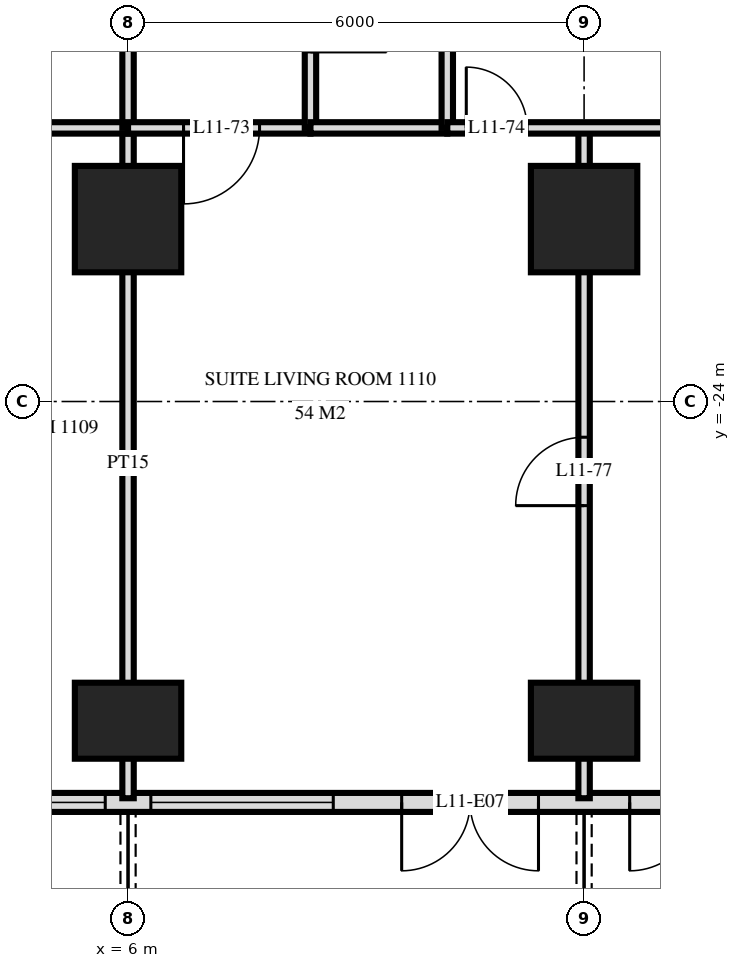
"""IFC4 building model, lengths in metres.
Left out: names, types, materials, properties, quantities, classifications, styles, units other than length and angle.
Written with IfcOpenShell. Run it as: python <this file> out.ifc"""

import sys

from ifc_helpers import new_model, si_unit, direction, frame, frame_2d, origin, origin_2d, place, context, subcontext, project, spatial, rectangle, extrude, element, fill, save


model = new_model("IFC4")
c1 = context("Model", 3, precision=1e-05, world=origin(), true_north=direction((0.0, 1.0)))
c2 = subcontext(c1, "Body", "Model", "MODEL_VIEW")
j1 = project(units=[si_unit("LENGTHUNIT", "METRE"), si_unit("PLANEANGLEUNIT", "RADIAN")], contexts=[c1])
p1 = place(None, origin())
s1 = spatial("IfcSite", under=j1, at=p1, CompositionType="ELEMENT")
p2 = place(p1, origin())
s2 = spatial("IfcBuilding", under=s1, at=p2, CompositionType="ELEMENT")
p3 = place(p2, frame((0.0, 0.0, 49.2)))
s3 = spatial("IfcBuildingStorey", under=s2, at=p3, CompositionType="ELEMENT", Elevation=49.2)
p4 = place(p3, frame((6.0, -28.2, 0.0), z_axis=(0.0, 0.0, 1.0), x_axis=(1.0, 0.0, 0.0)))
e1 = element("IfcColumn", 1, at=p4, inside=s3, PredefinedType="COLUMN", context=c2, shape_type="SweptSolid", body=[
    extrude(rectangle(XDim=1.4, YDim=1.0, at=origin_2d()), origin(), (0.0, 0.0, 1.0), 3.6),
])
p5 = place(p3, frame((6.0, -21.6, 0.0), z_axis=(0.0, 0.0, 1.0), x_axis=(1.0, 0.0, 0.0)))
e2 = element("IfcColumn", 2, at=p5, inside=s3, PredefinedType="COLUMN", context=c2, shape_type="SweptSolid", body=[
    extrude(rectangle(XDim=1.4, YDim=1.4, at=origin_2d()), origin(), (0.0, 0.0, 1.0), 3.6),
])
p6 = place(p3, frame((12.0, -28.2, 0.0), z_axis=(0.0, 0.0, 1.0), x_axis=(1.0, 0.0, 0.0)))
e3 = element("IfcColumn", 3, at=p6, inside=s3, PredefinedType="COLUMN", context=c2, shape_type="SweptSolid", body=[
    extrude(rectangle(XDim=1.4, YDim=1.0, at=origin_2d()), origin(), (0.0, 0.0, 1.0), 3.6),
])
p7 = place(p3, frame((12.0, -21.6, 0.0), z_axis=(0.0, 0.0, 1.0), x_axis=(1.0, 0.0, 0.0)))
e4 = element("IfcColumn", 4, at=p7, inside=s3, PredefinedType="COLUMN", context=c2, shape_type="SweptSolid", body=[
    extrude(rectangle(XDim=1.4, YDim=1.4, at=origin_2d()), origin(), (0.0, 0.0, 1.0), 3.6),
])
p8 = place(p3, frame((-28.775, -29.275, 0.0), z_axis=(0.0, 0.0, 1.0), x_axis=(1.0, 0.0, 0.0)))
e5 = element("IfcWall", 5, at=p8, inside=s3, PredefinedType="SOLIDWALL", context=c2, shape_type="SweptSolid", body=[
    extrude(rectangle(XDim=57.551, YDim=0.25, at=frame_2d((28.775, 0.0))), origin(), (0.0, 0.0, 1.0), 3.32),
])
p9 = place(p8, frame((0.575, 0.0, 0.0)))
e6 = element("IfcOpeningElement", 6, at=p9, cuts=e5, PredefinedType="OPENING", context=c2, shape_type="SweptSolid", body=[
    extrude(rectangle(XDim=1.8, YDim=2.4, at=frame_2d((0.9, 1.2))), frame((0.0, 0.135, 0.0), z_axis=(0.0, -1.0, 0.0), x_axis=(1.0, 0.0, 0.0)), (0.0, 0.0, 1.0), 0.27),
])
p10 = place(p8, frame((5.375, 0.0, 0.0)))
e7 = element("IfcOpeningElement", 7, at=p10, cuts=e5, PredefinedType="OPENING", context=c2, shape_type="SweptSolid", body=[
    extrude(rectangle(XDim=1.8, YDim=2.4, at=frame_2d((0.9, 1.2))), frame((0.0, 0.135, 0.0), z_axis=(0.0, -1.0, 0.0), x_axis=(1.0, 0.0, 0.0)), (0.0, 0.0, 1.0), 0.27),
])
p11 = place(p8, frame((8.075, 0.0, 0.3)))
e8 = element("IfcOpeningElement", 8, at=p11, cuts=e5, PredefinedType="OPENING", context=c2, shape_type="SweptSolid", body=[
    extrude(rectangle(XDim=2.4, YDim=2.1, at=frame_2d((1.2, 1.05))), frame((0.0, 0.135, 0.0), z_axis=(0.0, -1.0, 0.0), x_axis=(1.0, 0.0, 0.0)), (0.0, 0.0, 1.0), 0.27),
])
p12 = place(p8, frame((11.375, 0.0, 0.0)))
e9 = element("IfcOpeningElement", 9, at=p12, cuts=e5, PredefinedType="OPENING", context=c2, shape_type="SweptSolid", body=[
    extrude(rectangle(XDim=1.8, YDim=2.4, at=frame_2d((0.9, 1.2))), frame((0.0, 0.135, 0.0), z_axis=(0.0, -1.0, 0.0), x_axis=(1.0, 0.0, 0.0)), (0.0, 0.0, 1.0), 0.27),
])
p13 = place(p8, frame((14.075, 0.0, 0.3)))
e10 = element("IfcOpeningElement", 10, at=p13, cuts=e5, PredefinedType="OPENING", context=c2, shape_type="SweptSolid", body=[
    extrude(rectangle(XDim=2.4, YDim=2.1, at=frame_2d((1.2, 1.05))), frame((0.0, 0.135, 0.0), z_axis=(0.0, -1.0, 0.0), x_axis=(1.0, 0.0, 0.0)), (0.0, 0.0, 1.0), 0.27),
])
p14 = place(p8, frame((17.375, 0.0, 0.0)))
e11 = element("IfcOpeningElement", 11, at=p14, cuts=e5, PredefinedType="OPENING", context=c2, shape_type="SweptSolid", body=[
    extrude(rectangle(XDim=1.8, YDim=2.4, at=frame_2d((0.9, 1.2))), frame((0.0, 0.135, 0.0), z_axis=(0.0, -1.0, 0.0), x_axis=(1.0, 0.0, 0.0)), (0.0, 0.0, 1.0), 0.27),
])
p15 = place(p8, frame((20.075, 0.0, 0.3)))
e12 = element("IfcOpeningElement", 12, at=p15, cuts=e5, PredefinedType="OPENING", context=c2, shape_type="SweptSolid", body=[
    extrude(rectangle(XDim=2.4, YDim=2.1, at=frame_2d((1.2, 1.05))), frame((0.0, 0.135, 0.0), z_axis=(0.0, -1.0, 0.0), x_axis=(1.0, 0.0, 0.0)), (0.0, 0.0, 1.0), 0.27),
])
p16 = place(p8, frame((23.075, 0.0, 0.3)))
e13 = element("IfcOpeningElement", 13, at=p16, cuts=e5, PredefinedType="OPENING", context=c2, shape_type="SweptSolid", body=[
    extrude(rectangle(XDim=2.4, YDim=2.1, at=frame_2d((1.2, 1.05))), frame((0.0, 0.135, 0.0), z_axis=(0.0, -1.0, 0.0), x_axis=(1.0, 0.0, 0.0)), (0.0, 0.0, 1.0), 0.27),
])
p17 = place(p8, frame((26.375, 0.0, 0.0)))
e14 = element("IfcOpeningElement", 14, at=p17, cuts=e5, PredefinedType="OPENING", context=c2, shape_type="SweptSolid", body=[
    extrude(rectangle(XDim=1.8, YDim=2.4, at=frame_2d((0.9, 1.2))), frame((0.0, 0.135, 0.0), z_axis=(0.0, -1.0, 0.0), x_axis=(1.0, 0.0, 0.0)), (0.0, 0.0, 1.0), 0.27),
])
p18 = place(p8, frame((29.375, 0.0, 0.0)))
e15 = element("IfcOpeningElement", 15, at=p18, cuts=e5, PredefinedType="OPENING", context=c2, shape_type="SweptSolid", body=[
    extrude(rectangle(XDim=1.8, YDim=2.4, at=frame_2d((0.9, 1.2))), frame((0.0, 0.135, 0.0), z_axis=(0.0, -1.0, 0.0), x_axis=(1.0, 0.0, 0.0)), (0.0, 0.0, 1.0), 0.27),
])
p19 = place(p8, frame((32.075, 0.0, 0.3)))
e16 = element("IfcOpeningElement", 16, at=p19, cuts=e5, PredefinedType="OPENING", context=c2, shape_type="SweptSolid", body=[
    extrude(rectangle(XDim=2.4, YDim=2.1, at=frame_2d((1.2, 1.05))), frame((0.0, 0.135, 0.0), z_axis=(0.0, -1.0, 0.0), x_axis=(1.0, 0.0, 0.0)), (0.0, 0.0, 1.0), 0.27),
])
p20 = place(p8, frame((35.075, 0.0, 0.3)))
e17 = element("IfcOpeningElement", 17, at=p20, cuts=e5, PredefinedType="OPENING", context=c2, shape_type="SweptSolid", body=[
    extrude(rectangle(XDim=2.4, YDim=2.1, at=frame_2d((1.2, 1.05))), frame((0.0, 0.135, 0.0), z_axis=(0.0, -1.0, 0.0), x_axis=(1.0, 0.0, 0.0)), (0.0, 0.0, 1.0), 0.27),
])
p21 = place(p8, frame((38.375, 0.0, 0.0)))
e18 = element("IfcOpeningElement", 18, at=p21, cuts=e5, PredefinedType="OPENING", context=c2, shape_type="SweptSolid", body=[
    extrude(rectangle(XDim=1.8, YDim=2.4, at=frame_2d((0.9, 1.2))), frame((0.0, 0.135, 0.0), z_axis=(0.0, -1.0, 0.0), x_axis=(1.0, 0.0, 0.0)), (0.0, 0.0, 1.0), 0.27),
])
p22 = place(p8, frame((41.375, 0.0, 0.0)))
e19 = element("IfcOpeningElement", 19, at=p22, cuts=e5, PredefinedType="OPENING", context=c2, shape_type="SweptSolid", body=[
    extrude(rectangle(XDim=1.8, YDim=2.4, at=frame_2d((0.9, 1.2))), frame((0.0, 0.135, 0.0), z_axis=(0.0, -1.0, 0.0), x_axis=(1.0, 0.0, 0.0)), (0.0, 0.0, 1.0), 0.27),
])
p23 = place(p8, frame((44.075, 0.0, 0.3)))
e20 = element("IfcOpeningElement", 20, at=p23, cuts=e5, PredefinedType="OPENING", context=c2, shape_type="SweptSolid", body=[
    extrude(rectangle(XDim=2.4, YDim=2.1, at=frame_2d((1.2, 1.05))), frame((0.0, 0.135, 0.0), z_axis=(0.0, -1.0, 0.0), x_axis=(1.0, 0.0, 0.0)), (0.0, 0.0, 1.0), 0.27),
])
p24 = place(p8, frame((47.075, 0.0, 0.3)))
e21 = element("IfcOpeningElement", 21, at=p24, cuts=e5, PredefinedType="OPENING", context=c2, shape_type="SweptSolid", body=[
    extrude(rectangle(XDim=2.4, YDim=2.1, at=frame_2d((1.2, 1.05))), frame((0.0, 0.135, 0.0), z_axis=(0.0, -1.0, 0.0), x_axis=(1.0, 0.0, 0.0)), (0.0, 0.0, 1.0), 0.27),
])
p25 = place(p8, frame((50.375, 0.0, 0.0)))
e22 = element("IfcOpeningElement", 22, at=p25, cuts=e5, PredefinedType="OPENING", context=c2, shape_type="SweptSolid", body=[
    extrude(rectangle(XDim=1.8, YDim=2.4, at=frame_2d((0.9, 1.2))), frame((0.0, 0.135, 0.0), z_axis=(0.0, -1.0, 0.0), x_axis=(1.0, 0.0, 0.0)), (0.0, 0.0, 1.0), 0.27),
])
p26 = place(p8, frame((53.375, 0.0, 0.0)))
e23 = element("IfcOpeningElement", 23, at=p26, cuts=e5, PredefinedType="OPENING", context=c2, shape_type="SweptSolid", body=[
    extrude(rectangle(XDim=1.8, YDim=2.4, at=frame_2d((0.9, 1.2))), frame((0.0, 0.135, 0.0), z_axis=(0.0, -1.0, 0.0), x_axis=(1.0, 0.0, 0.0)), (0.0, 0.0, 1.0), 0.27),
])
p27 = place(p3, frame((12.0, -29.22, 0.0), z_axis=(0.0, 0.0, 1.0), x_axis=(0.0, 1.0, 0.0)))
e24 = element("IfcWall", 24, at=p27, inside=s3, PredefinedType="PARTITIONING", context=c2, shape_type="SweptSolid", body=[
    extrude(rectangle(XDim=8.82, YDim=0.15, at=frame_2d((4.41, 0.0))), origin(), (0.0, 0.0, 1.0), 3.32),
])
p28 = place(p27, frame((3.85, 0.0, 0.0)))
e25 = element("IfcOpeningElement", 25, at=p28, cuts=e24, PredefinedType="OPENING", context=c2, shape_type="SweptSolid", body=[
    extrude(rectangle(XDim=0.9, YDim=2.1, at=frame_2d((0.45, 1.05))), frame((0.0, 0.085, 0.0), z_axis=(0.0, -1.0, 0.0), x_axis=(1.0, 0.0, 0.0)), (0.0, 0.0, 1.0), 0.17),
])
p29 = place(p3, frame((10.2, -20.4, 0.0), z_axis=(0.0, 0.0, 1.0), x_axis=(0.0, 1.0, 0.0)))
e26 = element("IfcWall", 26, at=p29, inside=s3, PredefinedType="PLUMBINGWALL", context=c2, shape_type="SweptSolid", body=[
    extrude(rectangle(XDim=3.0, YDim=0.15, at=frame_2d((1.5, 0.0))), origin(), (0.0, 0.0, 1.0), 3.32),
])
p30 = place(p3, frame((8.4, -20.4, 0.0), z_axis=(0.0, 0.0, 1.0), x_axis=(0.0, 1.0, 0.0)))
e27 = element("IfcWall", 27, at=p30, inside=s3, PredefinedType="PARTITIONING", context=c2, shape_type="SweptSolid", body=[
    extrude(rectangle(XDim=3.0, YDim=0.15, at=frame_2d((1.5, 0.0))), origin(), (0.0, 0.0, 1.0), 3.32),
])
p31 = place(p30, frame((1.0, 0.0, 0.0)))
e28 = element("IfcOpeningElement", 28, at=p31, cuts=e27, PredefinedType="OPENING", context=c2, shape_type="SweptSolid", body=[
    extrude(rectangle(XDim=1.0, YDim=2.1, at=frame_2d((0.5, 1.05))), frame((0.0, 0.085, 0.0), z_axis=(0.0, -1.0, 0.0), x_axis=(1.0, 0.0, 0.0)), (0.0, 0.0, 1.0), 0.17),
])
p32 = place(p3, frame((6.0, -20.4, 0.0), z_axis=(0.0, 0.0, 1.0), x_axis=(0.0, 1.0, 0.0)))
e29 = element("IfcWall", 29, at=p32, inside=s3, PredefinedType="PARTITIONING", context=c2, shape_type="SweptSolid", body=[
    extrude(rectangle(XDim=3.0, YDim=0.15, at=frame_2d((1.5, 0.0))), origin(), (0.0, 0.0, 1.0), 3.32),
])
p33 = place(p3, frame((6.0, -29.22, 0.0), z_axis=(0.0, 0.0, 1.0), x_axis=(0.0, 1.0, 0.0)))
e30 = element("IfcWall", 30, at=p33, inside=s3, PredefinedType="PARTITIONING", context=c2, shape_type="SweptSolid", body=[
    extrude(rectangle(XDim=8.82, YDim=0.15, at=frame_2d((4.41, 0.0))), origin(), (0.0, 0.0, 1.0), 3.32),
])
p34 = place(p3, frame((6.0, -20.4, 0.0), z_axis=(0.0, 0.0, 1.0), x_axis=(1.0, 0.0, 0.0)))
e31 = element("IfcWall", 31, at=p34, inside=s3, PredefinedType="PARTITIONING", context=c2, shape_type="SweptSolid", body=[
    extrude(rectangle(XDim=2.4, YDim=0.15, at=frame_2d((1.2, 0.0))), origin(), (0.0, 0.0, 1.0), 3.32),
])
p35 = place(p34, frame((0.73, 0.0, 0.0)))
e32 = element("IfcOpeningElement", 32, at=p35, cuts=e31, PredefinedType="OPENING", context=c2, shape_type="SweptSolid", body=[
    extrude(rectangle(XDim=1.0, YDim=2.1, at=frame_2d((0.5, 1.05))), frame((0.0, 0.085, 0.0), z_axis=(0.0, -1.0, 0.0), x_axis=(1.0, 0.0, 0.0)), (0.0, 0.0, 1.0), 0.17),
])
p36 = place(p3, frame((4.3, -20.4, 0.0), z_axis=(0.0, 0.0, 1.0), x_axis=(1.0, 0.0, 0.0)))
e33 = element("IfcWall", 33, at=p36, inside=s3, PredefinedType="PARTITIONING", context=c2, shape_type="SweptSolid", body=[
    extrude(rectangle(XDim=1.7, YDim=0.15, at=frame_2d((0.85, 0.0))), origin(), (0.0, 0.0, 1.0), 3.32),
])
p37 = place(p3, frame((10.2, -20.4, 0.0), z_axis=(0.0, 0.0, 1.0), x_axis=(1.0, 0.0, 0.0)))
e34 = element("IfcWall", 34, at=p37, inside=s3, PredefinedType="PARTITIONING", context=c2, shape_type="SweptSolid", body=[
    extrude(rectangle(XDim=7.8, YDim=0.15, at=frame_2d((3.9, 0.0))), origin(), (0.0, 0.0, 1.0), 3.32),
])
p38 = place(p37, frame((0.25, 0.0, 0.0)))
e35 = element("IfcOpeningElement", 35, at=p38, cuts=e34, PredefinedType="OPENING", context=c2, shape_type="SweptSolid", body=[
    extrude(rectangle(XDim=0.8, YDim=2.1, at=frame_2d((0.4, 1.05))), frame((0.0, 0.085, 0.0), z_axis=(0.0, -1.0, 0.0), x_axis=(1.0, 0.0, 0.0)), (0.0, 0.0, 1.0), 0.17),
])
p39 = place(p37, frame((4.03, 0.0, 0.0)))
e36 = element("IfcOpeningElement", 36, at=p39, cuts=e34, PredefinedType="OPENING", context=c2, shape_type="SweptSolid", body=[
    extrude(rectangle(XDim=0.9, YDim=2.1, at=frame_2d((0.45, 1.05))), frame((0.0, 0.085, 0.0), z_axis=(0.0, -1.0, 0.0), x_axis=(1.0, 0.0, 0.0)), (0.0, 0.0, 1.0), 0.17),
])
p40 = place(p37, frame((6.2, 0.0, 0.0)))
e37 = element("IfcOpeningElement", 37, at=p40, cuts=e34, PredefinedType="OPENING", context=c2, shape_type="SweptSolid", body=[
    extrude(rectangle(XDim=0.9, YDim=2.1, at=frame_2d((0.45, 1.05))), frame((0.0, 0.085, 0.0), z_axis=(0.0, -1.0, 0.0), x_axis=(1.0, 0.0, 0.0)), (0.0, 0.0, 1.0), 0.17),
])
p41 = place(p3, frame((8.4, -20.4, 0.0), z_axis=(0.0, 0.0, 1.0), x_axis=(1.0, 0.0, 0.0)))
e38 = element("IfcWall", 38, at=p41, inside=s3, PredefinedType="PLUMBINGWALL", context=c2, shape_type="SweptSolid", body=[
    extrude(rectangle(XDim=1.8, YDim=0.15, at=frame_2d((0.9, 0.0))), origin(), (0.0, 0.0, 1.0), 3.32),
])
p42 = place(p19, origin())
e39 = element("IfcWindow", 39, at=p42, inside=s3, PartitioningType="SINGLE_PANEL", PredefinedType="WINDOW", context=c2, shape_type="SweptSolid", body=[
    extrude(rectangle(XDim=2.4, YDim=2.1, at=frame_2d((1.2, 1.05))), frame((0.0, 0.03, 0.0), z_axis=(0.0, -1.0, 0.0), x_axis=(1.0, 0.0, 0.0)), (0.0, 0.0, 1.0), 0.06),
])
fill(e16, e39)
p43 = place(p20, origin())
e40 = element("IfcWindow", 40, at=p43, inside=s3, PartitioningType="SINGLE_PANEL", PredefinedType="WINDOW", context=c2, shape_type="SweptSolid", body=[
    extrude(rectangle(XDim=2.4, YDim=2.1, at=frame_2d((1.2, 1.05))), frame((0.0, 0.03, 0.0), z_axis=(0.0, -1.0, 0.0), x_axis=(1.0, 0.0, 0.0)), (0.0, 0.0, 1.0), 0.06),
])
fill(e17, e40)
p44 = place(p21, frame((0.9, 0.0, 0.0), z_axis=(0.0, 0.0, 1.0), x_axis=(-1.0, 0.0, 0.0)))
e41 = element("IfcDoor", 41, at=p44, inside=s3, OperationType="DOUBLE_DOOR_SINGLE_SWING", PredefinedType="DOOR", context=c2, shape_type="SweptSolid", body=[
    extrude(rectangle(XDim=1.8, YDim=2.4, at=frame_2d((0.0, 1.2))), frame((0.0, -0.025, 0.0), z_axis=(0.0, 1.0, 0.0), x_axis=(-1.0, 0.0, 0.0)), (0.0, 0.0, 1.0), 0.05),
])
fill(e18, e41)
p45 = place(p22, frame((0.9, 0.0, 0.0), z_axis=(0.0, 0.0, 1.0), x_axis=(-1.0, 0.0, 0.0)))
e42 = element("IfcDoor", 42, at=p45, inside=s3, OperationType="DOUBLE_DOOR_SINGLE_SWING", PredefinedType="DOOR", context=c2, shape_type="SweptSolid", body=[
    extrude(rectangle(XDim=1.8, YDim=2.4, at=frame_2d((0.0, 1.2))), frame((0.0, -0.025, 0.0), z_axis=(0.0, 1.0, 0.0), x_axis=(-1.0, 0.0, 0.0)), (0.0, 0.0, 1.0), 0.05),
])
fill(e19, e42)
p46 = place(p35, frame((0.5, 0.0, 0.0), z_axis=(0.0, 0.0, 1.0), x_axis=(-1.0, 0.0, 0.0)))
e43 = element("IfcDoor", 43, at=p46, inside=s3, OperationType="SINGLE_SWING_LEFT", PredefinedType="DOOR", context=c2, shape_type="SweptSolid", body=[
    extrude(rectangle(XDim=1.0, YDim=2.1, at=frame_2d((0.0, 1.05))), frame((0.0, -0.025, 0.0), z_axis=(0.0, 1.0, 0.0), x_axis=(-1.0, 0.0, 0.0)), (0.0, 0.0, 1.0), 0.05),
])
fill(e32, e43)
p47 = place(p38, origin())
e44 = element("IfcDoor", 44, at=p47, inside=s3, OperationType="SINGLE_SWING_RIGHT", PredefinedType="DOOR", context=c2, shape_type="SweptSolid", body=[
    extrude(rectangle(XDim=0.8, YDim=2.1, at=frame_2d((0.4, 1.05))), frame((0.0, 0.025, 0.0), z_axis=(0.0, -1.0, 0.0), x_axis=(1.0, 0.0, 0.0)), (0.0, 0.0, 1.0), 0.05),
])
fill(e35, e44)
p48 = place(p28, origin())
e45 = element("IfcDoor", 45, at=p48, inside=s3, OperationType="SINGLE_SWING_RIGHT", PredefinedType="DOOR", context=c2, shape_type="SweptSolid", body=[
    extrude(rectangle(XDim=0.9, YDim=2.1, at=frame_2d((0.45, 1.05))), frame((0.0, 0.025, 0.0), z_axis=(0.0, -1.0, 0.0), x_axis=(1.0, 0.0, 0.0)), (0.0, 0.0, 1.0), 0.05),
])
fill(e25, e45)
save(model, sys.argv[1])
